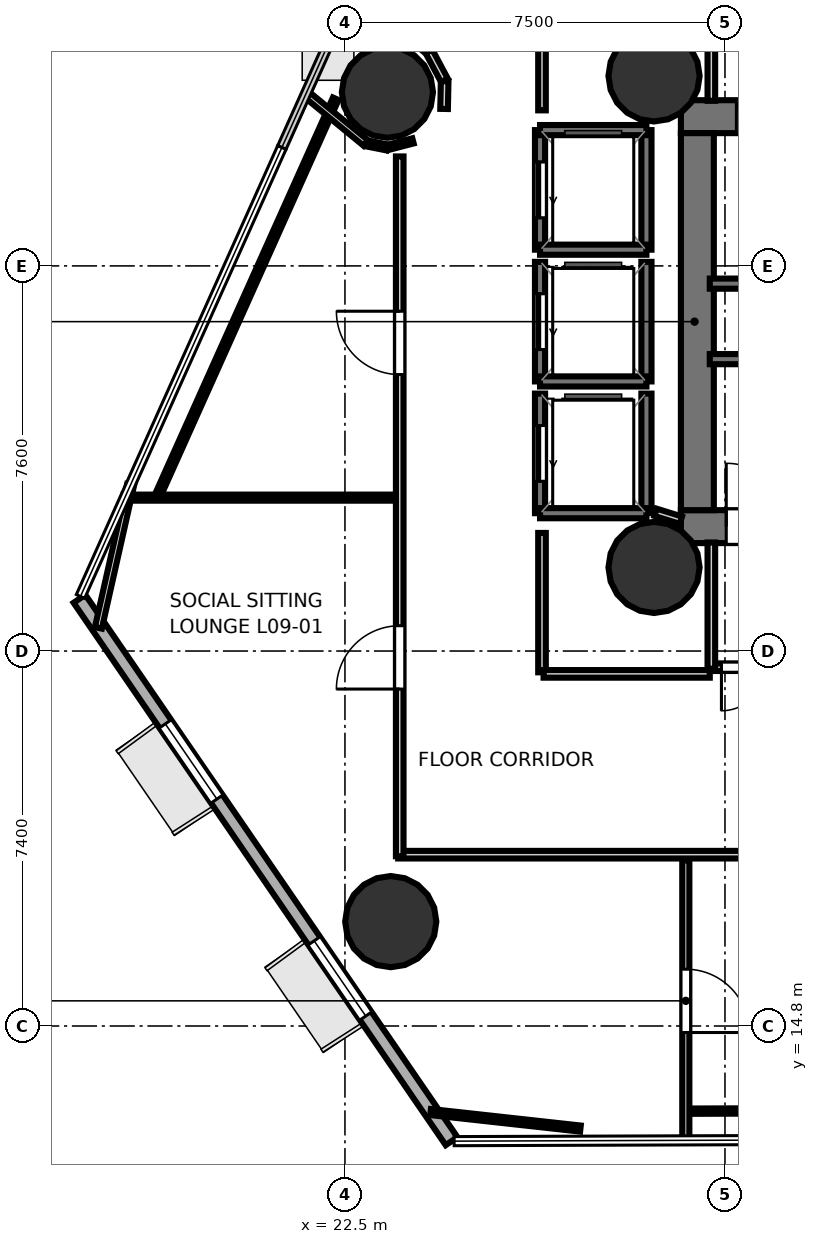
"""IFC4 building model, lengths in metres.
Left out: names, types, materials, properties, quantities, classifications, styles, units other than length and angle.
Written with IfcOpenShell. Run it as: python <this file> out.ifc"""

import sys

from ifc_helpers import new_model, si_unit, direction, frame, frame_2d, origin, origin_2d, place, context, subcontext, project, spatial, rectangle, hollow_circle, extrude, element, fill, save


model = new_model("IFC4")
c1 = context("Model", 3, precision=1e-05, world=origin(), true_north=direction((0.0, 1.0)))
c2 = subcontext(c1, "Body", "Model", "MODEL_VIEW")
j1 = project(units=[si_unit("LENGTHUNIT", "METRE"), si_unit("PLANEANGLEUNIT", "RADIAN")], contexts=[c1])
p1 = place(None, origin())
s1 = spatial("IfcSite", under=j1, at=p1, CompositionType="ELEMENT")
p2 = place(p1, origin())
s2 = spatial("IfcBuilding", under=s1, at=p2, CompositionType="ELEMENT")
p3 = place(p2, frame((0.0, 0.0, 40.5)))
s3 = spatial("IfcBuildingStorey", under=s2, at=p3, CompositionType="ELEMENT", Elevation=40.5)
p4 = place(p3, frame((29.13, 32.745, 0.0), z_axis=(0.0, 0.0, 1.0), x_axis=(1.0, 0.0, 0.0)))
e1 = element("IfcWall", 1, at=p4, inside=s3, PredefinedType="SHEAR", context=c2, shape_type="SweptSolid", body=[
    extrude(rectangle(XDim=10.72, YDim=0.65, at=frame_2d((5.36, 0.0))), origin(), (0.0, 0.0, 1.0), 3.52),
])
p5 = place(p4, frame((1.095, 0.0, 0.0)))
e2 = element("IfcOpeningElement", 2, at=p5, cuts=e1, PredefinedType="OPENING", context=c2, shape_type="SweptSolid", body=[
    extrude(rectangle(XDim=1.25, YDim=2.15, at=frame_2d((0.625, 1.075))), frame((0.0, 0.335, 0.0), z_axis=(0.0, -1.0, 0.0), x_axis=(1.0, 0.0, 0.0)), (0.0, 0.0, 1.0), 0.67),
])
p6 = place(p3, frame((29.13, 24.655, 0.0), z_axis=(0.0, 0.0, 1.0), x_axis=(1.0, 0.0, 0.0)))
e3 = element("IfcWall", 3, at=p6, inside=s3, PredefinedType="SHEAR", context=c2, shape_type="SweptSolid", body=[
    extrude(rectangle(XDim=10.72, YDim=0.65, at=frame_2d((5.36, 0.0))), origin(), (0.0, 0.0, 1.0), 3.52),
])
p7 = place(p6, frame((0.895, 0.0, 0.0)))
e4 = element("IfcOpeningElement", 4, at=p7, cuts=e3, PredefinedType="OPENING", context=c2, shape_type="SweptSolid", body=[
    extrude(rectangle(XDim=1.25, YDim=2.15, at=frame_2d((0.625, 1.075))), frame((0.0, 0.335, 0.0), z_axis=(0.0, -1.0, 0.0), x_axis=(1.0, 0.0, 0.0)), (0.0, 0.0, 1.0), 0.67),
])
p8 = place(p3, frame((29.455, 24.98, 0.0), z_axis=(0.0, 0.0, 1.0), x_axis=(0.0, 1.0, 0.0)))
e5 = element("IfcWall", 5, at=p8, inside=s3, PredefinedType="SHEAR", context=c2, shape_type="SweptSolid", body=[
    extrude(rectangle(XDim=7.44, YDim=0.65, at=frame_2d((3.72, 0.0))), origin(), (0.0, 0.0, 1.0), 3.52),
])
for number, where, z_axis, x_axis in (
    (6, (28.6, 33.55, 0.0), (0.0, 0.0, 1.0), (1.0, 0.0, 0.0)),
    (7, (28.6, 23.85, 0.0), (0.0, 0.0, 1.0), (1.0, 0.0, 0.0)),
    (8, (23.338, 33.228, 0.0), (0.0, 0.0, 1.0), (1.0, 0.0, 0.0)),
    (9, (23.404, 16.86, 0.0), (0.0, 0.0, 1.0), (1.0, 0.0, 0.0)),
):
    element("IfcColumn", number, at=place(p3, frame(where, z_axis=z_axis, x_axis=x_axis)), inside=s3, PredefinedType="COLUMN", context=c2, shape_type="SweptSolid", body=[
        extrude(hollow_circle(Radius=0.9, WallThickness=0.045, at=origin_2d()), origin(), (0.0, 0.0, 1.0), 3.7),
    ])
p9 = place(p3, frame((17.26, 23.232, 0.0), z_axis=(0.0, 0.0, 1.0), x_axis=(0.565752744853, -0.824574940009, 0.0)))
e10 = element("IfcWall", 10, at=p9, inside=s3, PredefinedType="SOLIDWALL", context=c2, shape_type="SweptSolid", body=[
    extrude(rectangle(XDim=12.981, YDim=0.28, at=frame_2d((6.491, 0.0))), origin(), (0.0, 0.0, 1.0), 3.52),
])
p10 = place(p9, frame((2.994, 0.0, 0.85)))
e11 = element("IfcOpeningElement", 11, at=p10, cuts=e10, PredefinedType="OPENING", context=c2, shape_type="SweptSolid", body=[
    extrude(rectangle(XDim=1.8, YDim=2.1, at=frame_2d((0.9, 1.05))), frame((0.0, 0.15, 0.0), z_axis=(0.0, -1.0, 0.0), x_axis=(1.0, 0.0, 0.0)), (0.0, 0.0, 1.0), 0.3),
])
p11 = place(p9, frame((8.187, 0.0, 0.85)))
e12 = element("IfcOpeningElement", 12, at=p11, cuts=e10, PredefinedType="OPENING", context=c2, shape_type="SweptSolid", body=[
    extrude(rectangle(XDim=1.8, YDim=2.1, at=frame_2d((0.9, 1.05))), frame((0.0, 0.15, 0.0), z_axis=(0.0, -1.0, 0.0), x_axis=(1.0, 0.0, 0.0)), (0.0, 0.0, 1.0), 0.3),
])
p12 = place(p3, frame((29.7, 29.45, 0.0), z_axis=(0.0, 0.0, 1.0), x_axis=(1.0, 0.0, 0.0)))
e13 = element("IfcWall", 13, at=p12, inside=s3, PredefinedType="SOLIDWALL", context=c2, shape_type="SweptSolid", body=[
    extrude(rectangle(XDim=8.3, YDim=0.2, at=frame_2d((4.15, 0.0))), origin(), (0.0, 0.0, 1.0), 3.52),
])
p13 = place(p3, frame((29.7, 27.96, 0.0), z_axis=(0.0, 0.0, 1.0), x_axis=(1.0, 0.0, 0.0)))
e14 = element("IfcWall", 14, at=p13, inside=s3, PredefinedType="SOLIDWALL", context=c2, shape_type="SweptSolid", body=[
    extrude(rectangle(XDim=7.75, YDim=0.2, at=frame_2d((3.875, 0.0))), origin(), (0.0, 0.0, 1.0), 3.52),
])
p14 = place(p3, frame((28.45, 30.12, 0.0), z_axis=(0.0, 0.0, 1.0), x_axis=(0.0, 1.0, 0.0)))
e15 = element("IfcWall", 15, at=p14, inside=s3, PredefinedType="SOLIDWALL", context=c2, shape_type="SweptSolid", body=[
    extrude(rectangle(XDim=2.36, YDim=0.2, at=frame_2d((1.18, 0.0))), origin(), (0.0, 0.0, 1.0), 3.52),
])
p15 = place(p3, frame((26.35, 30.12, 0.0), z_axis=(0.0, 0.0, 1.0), x_axis=(0.0, 1.0, 0.0)))
e16 = element("IfcWall", 16, at=p15, inside=s3, PredefinedType="SOLIDWALL", context=c2, shape_type="SweptSolid", body=[
    extrude(rectangle(XDim=2.36, YDim=0.2, at=frame_2d((1.18, 0.0))), origin(), (0.0, 0.0, 1.0), 3.52),
])
p16 = place(p15, frame((0.63, 0.0, 0.0)))
e17 = element("IfcOpeningElement", 17, at=p16, cuts=e16, PredefinedType="OPENING", context=c2, shape_type="SweptSolid", body=[
    extrude(rectangle(XDim=1.1, YDim=2.15, at=frame_2d((0.55, 1.075))), frame((0.0, 0.11, 0.0), z_axis=(0.0, -1.0, 0.0), x_axis=(1.0, 0.0, 0.0)), (0.0, 0.0, 1.0), 0.22),
])
for number, where, z_axis, x_axis in (
    (18, (26.35, 32.48, 0.0), (0.0, 0.0, 1.0), (1.0, 0.0, 0.0)),
    (19, (26.35, 30.12, 0.0), (0.0, 0.0, 1.0), (1.0, 0.0, 0.0)),
):
    element("IfcWall", number, at=place(p3, frame(where, z_axis=z_axis, x_axis=x_axis)), inside=s3, PredefinedType="SOLIDWALL", context=c2, shape_type="SweptSolid", body=[
        extrude(rectangle(XDim=2.1, YDim=0.2, at=frame_2d((1.05, 0.0))), origin(), (0.0, 0.0, 1.0), 3.52),
    ])
p17 = place(p3, frame((28.45, 27.52, 0.0), z_axis=(0.0, 0.0, 1.0), x_axis=(0.0, 1.0, 0.0)))
e20 = element("IfcWall", 20, at=p17, inside=s3, PredefinedType="SOLIDWALL", context=c2, shape_type="SweptSolid", body=[
    extrude(rectangle(XDim=2.36, YDim=0.2, at=frame_2d((1.18, 0.0))), origin(), (0.0, 0.0, 1.0), 3.52),
])
p18 = place(p3, frame((26.35, 27.52, 0.0), z_axis=(0.0, 0.0, 1.0), x_axis=(0.0, 1.0, 0.0)))
e21 = element("IfcWall", 21, at=p18, inside=s3, PredefinedType="SOLIDWALL", context=c2, shape_type="SweptSolid", body=[
    extrude(rectangle(XDim=2.36, YDim=0.2, at=frame_2d((1.18, 0.0))), origin(), (0.0, 0.0, 1.0), 3.52),
])
p19 = place(p18, frame((0.63, 0.0, 0.0)))
e22 = element("IfcOpeningElement", 22, at=p19, cuts=e21, PredefinedType="OPENING", context=c2, shape_type="SweptSolid", body=[
    extrude(rectangle(XDim=1.1, YDim=2.15, at=frame_2d((0.55, 1.075))), frame((0.0, 0.11, 0.0), z_axis=(0.0, -1.0, 0.0), x_axis=(1.0, 0.0, 0.0)), (0.0, 0.0, 1.0), 0.22),
])
p20 = place(p3, frame((26.35, 27.52, 0.0), z_axis=(0.0, 0.0, 1.0), x_axis=(1.0, 0.0, 0.0)))
e23 = element("IfcWall", 23, at=p20, inside=s3, PredefinedType="SOLIDWALL", context=c2, shape_type="SweptSolid", body=[
    extrude(rectangle(XDim=2.1, YDim=0.2, at=frame_2d((1.05, 0.0))), origin(), (0.0, 0.0, 1.0), 3.52),
])
p21 = place(p3, frame((28.45, 24.92, 0.0), z_axis=(0.0, 0.0, 1.0), x_axis=(0.0, 1.0, 0.0)))
e24 = element("IfcWall", 24, at=p21, inside=s3, PredefinedType="SOLIDWALL", context=c2, shape_type="SweptSolid", body=[
    extrude(rectangle(XDim=2.36, YDim=0.2, at=frame_2d((1.18, 0.0))), origin(), (0.0, 0.0, 1.0), 3.52),
])
p22 = place(p3, frame((26.35, 24.92, 0.0), z_axis=(0.0, 0.0, 1.0), x_axis=(0.0, 1.0, 0.0)))
e25 = element("IfcWall", 25, at=p22, inside=s3, PredefinedType="SOLIDWALL", context=c2, shape_type="SweptSolid", body=[
    extrude(rectangle(XDim=2.36, YDim=0.2, at=frame_2d((1.18, 0.0))), origin(), (0.0, 0.0, 1.0), 3.52),
])
p23 = place(p22, frame((0.63, 0.0, 0.0)))
e26 = element("IfcOpeningElement", 26, at=p23, cuts=e25, PredefinedType="OPENING", context=c2, shape_type="SweptSolid", body=[
    extrude(rectangle(XDim=1.1, YDim=2.15, at=frame_2d((0.55, 1.075))), frame((0.0, 0.11, 0.0), z_axis=(0.0, -1.0, 0.0), x_axis=(1.0, 0.0, 0.0)), (0.0, 0.0, 1.0), 0.22),
])
p24 = place(p3, frame((26.35, 24.92, 0.0), z_axis=(0.0, 0.0, 1.0), x_axis=(1.0, 0.0, 0.0)))
e27 = element("IfcWall", 27, at=p24, inside=s3, PredefinedType="SOLIDWALL", context=c2, shape_type="SweptSolid", body=[
    extrude(rectangle(XDim=2.1, YDim=0.2, at=frame_2d((1.05, 0.0))), origin(), (0.0, 0.0, 1.0), 3.52),
])
p25 = place(p3, frame((29.731, 33.058, 0.0), z_axis=(0.0, 0.0, 1.0), x_axis=(0.0, 1.0, 0.0)))
e28 = element("IfcWall", 28, at=p25, inside=s3, PredefinedType="PARTITIONING", context=c2, shape_type="SweptSolid", body=[
    extrude(rectangle(XDim=2.462, YDim=0.15, at=frame_2d((1.231, 0.0))), origin(), (0.0, 0.0, 1.0), 2.84),
])
p26 = place(p3, frame((33.45, 21.881, 0.0), z_axis=(0.0, 0.0, 1.0), x_axis=(-1.0, 0.0, 0.0)))
e29 = element("IfcWall", 29, at=p26, inside=s3, PredefinedType="PARTITIONING", context=c2, shape_type="SweptSolid", body=[
    extrude(rectangle(XDim=3.75, YDim=0.15, at=frame_2d((1.875, 0.0))), origin(), (0.0, 0.0, 1.0), 2.84),
])
p27 = place(p26, frame((1.275, 0.0, 0.0)))
e30 = element("IfcOpeningElement", 30, at=p27, cuts=e29, PredefinedType="OPENING", context=c2, shape_type="SweptSolid", body=[
    extrude(rectangle(XDim=1.2, YDim=2.15, at=frame_2d((0.6, 1.075))), frame((0.0, 0.085, 0.0), z_axis=(0.0, -1.0, 0.0), x_axis=(1.0, 0.0, 0.0)), (0.0, 0.0, 1.0), 0.17),
])
p28 = place(p26, frame((2.66, 0.0, 0.0)))
e31 = element("IfcOpeningElement", 31, at=p28, cuts=e29, PredefinedType="OPENING", context=c2, shape_type="SweptSolid", body=[
    extrude(rectangle(XDim=0.86, YDim=2.05, at=frame_2d((0.43, 1.025))), frame((0.0, 0.085, 0.0), z_axis=(0.0, -1.0, 0.0), x_axis=(1.0, 0.0, 0.0)), (0.0, 0.0, 1.0), 0.17),
])
p29 = place(p3, frame((29.731, 21.85, 0.0), z_axis=(0.0, 0.0, 1.0), x_axis=(0.0, 1.0, 0.0)))
e32 = element("IfcWall", 32, at=p29, inside=s3, PredefinedType="PARTITIONING", context=c2, shape_type="SweptSolid", body=[
    extrude(rectangle(XDim=2.492, YDim=0.15, at=frame_2d((1.246, 0.0))), origin(), (0.0, 0.0, 1.0), 2.84),
])
p30 = place(p3, frame((29.13, 24.782, 0.0), z_axis=(0.0, 0.0, 1.0), x_axis=(-0.955000482512, 0.296604245422, 0.0)))
e33 = element("IfcWall", 33, at=p30, inside=s3, PredefinedType="PARTITIONING", context=c2, shape_type="SweptSolid", body=[
    extrude(rectangle(XDim=0.524, YDim=0.15, at=frame_2d((0.262, 0.0))), origin(), (0.0, 0.0, 1.0), 2.84),
])
p31 = place(p3, frame((24.464, 33.461, 0.0), z_axis=(0.0, 0.0, 1.0), x_axis=(-0.4715232649, 0.881853622014, 0.0)))
e34 = element("IfcWall", 34, at=p31, inside=s3, PredefinedType="PARTITIONING", context=c2, shape_type="SweptSolid", body=[
    extrude(rectangle(XDim=0.65, YDim=0.15, at=frame_2d((0.325, 0.0))), origin(), (0.0, 0.0, 1.0), 2.798),
])
p32 = place(p3, frame((24.15, 34.044, 0.0), z_axis=(0.0, 0.0, 1.0), x_axis=(-0.773007182635, 0.634397269536, 0.0)))
e35 = element("IfcWall", 35, at=p32, inside=s3, PredefinedType="PARTITIONING", context=c2, shape_type="SweptSolid", body=[
    extrude(rectangle(XDim=1.948, YDim=0.15, at=frame_2d((0.974, 0.0))), origin(), (0.0, 0.0, 1.0), 2.798),
])
p33 = place(p3, frame((26.389, 35.58, 0.0), z_axis=(0.0, 0.0, 1.0), x_axis=(0.0, -1.0, 0.0)))
e36 = element("IfcWall", 36, at=p33, inside=s3, PredefinedType="PARTITIONING", context=c2, shape_type="SweptSolid", body=[
    extrude(rectangle(XDim=2.71, YDim=0.15, at=frame_2d((1.355, 0.0))), origin(), (0.0, 0.0, 1.0), 2.798),
])
p34 = place(p3, frame((26.389, 24.531, 0.0), z_axis=(0.0, 0.0, 1.0), x_axis=(0.0, -1.0, 0.0)))
e37 = element("IfcWall", 37, at=p34, inside=s3, PredefinedType="PARTITIONING", context=c2, shape_type="SweptSolid", body=[
    extrude(rectangle(XDim=2.75, YDim=0.15, at=frame_2d((1.375, 0.0))), origin(), (0.0, 0.0, 1.0), 2.84),
])
p35 = place(p3, frame((26.42, 21.749, 0.0), z_axis=(0.0, 0.0, 1.0), x_axis=(1.0, 0.0, 0.0)))
e38 = element("IfcWall", 38, at=p35, inside=s3, PredefinedType="PARTITIONING", context=c2, shape_type="SweptSolid", body=[
    extrude(rectangle(XDim=3.28, YDim=0.15, at=frame_2d((1.64, 0.0))), origin(), (0.0, 0.0, 1.0), 2.84),
])
p36 = place(p3, frame((33.32, 18.181, 0.0), z_axis=(0.0, 0.0, 1.0), x_axis=(-1.0, 0.0, 0.0)))
e39 = element("IfcWall", 39, at=p36, inside=s3, PredefinedType="PARTITIONING", context=c2, shape_type="SweptSolid", body=[
    extrude(rectangle(XDim=9.77, YDim=0.15, at=frame_2d((4.885, 0.0))), origin(), (0.0, 0.0, 1.0), 2.798),
])
p37 = place(p3, frame((23.581, 18.15, 0.0), z_axis=(0.0, 0.0, 1.0), x_axis=(0.0, 1.0, 0.0)))
e40 = element("IfcWall", 40, at=p37, inside=s3, PredefinedType="PARTITIONING", context=c2, shape_type="SweptSolid", body=[
    extrude(rectangle(XDim=13.81, YDim=0.15, at=frame_2d((6.905, 0.0))), origin(), (0.0, 0.0, 1.0), 2.798),
])
p38 = place(p37, frame((3.299, 0.0, 0.0)))
e41 = element("IfcOpeningElement", 41, at=p38, cuts=e40, PredefinedType="OPENING", context=c2, shape_type="SweptSolid", body=[
    extrude(rectangle(XDim=1.25, YDim=2.2, at=frame_2d((0.625, 1.1))), frame((0.0, 0.085, 0.0), z_axis=(0.0, -1.0, 0.0), x_axis=(1.0, 0.0, 0.0)), (0.0, 0.0, 1.0), 0.17),
])
p39 = place(p37, frame((9.506, 0.0, 0.0)))
e42 = element("IfcOpeningElement", 42, at=p39, cuts=e40, PredefinedType="OPENING", context=c2, shape_type="SweptSolid", body=[
    extrude(rectangle(XDim=1.25, YDim=2.2, at=frame_2d((0.625, 1.1))), frame((0.0, 0.085, 0.0), z_axis=(0.0, -1.0, 0.0), x_axis=(1.0, 0.0, 0.0)), (0.0, 0.0, 1.0), 0.17),
])
p40 = place(p3, frame((24.457, 32.897, 0.0), z_axis=(0.0, 0.0, 1.0), x_axis=(0.020031598679, 0.999799347396, 0.0)))
e43 = element("IfcWall", 43, at=p40, inside=s3, PredefinedType="PARTITIONING", context=c2, shape_type="SweptSolid", body=[
    extrude(rectangle(XDim=0.548, YDim=0.15, at=frame_2d((0.274, 0.0))), origin(), (0.0, 0.0, 1.0), 2.84),
])
p41 = place(p3, frame((29.227, 18.07, 0.0), z_axis=(0.0, 0.0, 1.0), x_axis=(0.0, -1.0, 0.0)))
e44 = element("IfcWall", 44, at=p41, inside=s3, PredefinedType="PARTITIONING", context=c2, shape_type="SweptSolid", body=[
    extrude(rectangle(XDim=5.547, YDim=0.14, at=frame_2d((2.773, 0.0))), origin(), (0.0, 0.0, 1.0), 2.798),
])
p42 = place(p41, frame((2.148, 0.0, 0.0)))
e45 = element("IfcOpeningElement", 45, at=p42, cuts=e44, PredefinedType="OPENING", context=c2, shape_type="SweptSolid", body=[
    extrude(rectangle(XDim=1.25, YDim=2.2, at=frame_2d((0.625, 1.1))), frame((0.0, 0.08, 0.0), z_axis=(0.0, -1.0, 0.0), x_axis=(1.0, 0.0, 0.0)), (0.0, 0.0, 1.0), 0.16),
])
p43 = place(p3, frame((27.147, 12.776, 0.0), z_axis=(0.0, 0.0, 1.0), x_axis=(-0.993980428433, 0.109557783352, 0.0)))
e46 = element("IfcWall", 46, at=p43, inside=s3, PredefinedType="PARTITIONING", context=c2, shape_type="SweptSolid", body=[
    extrude(rectangle(XDim=2.975, YDim=0.12, at=frame_2d((1.487, 0.0))), origin(), (0.0, 0.0, 1.0), 2.84),
])
p44 = place(p3, frame((17.634, 22.657, 0.0), z_axis=(0.0, 0.0, 1.0), x_axis=(0.219546313743, 0.975602078781, 0.0)))
e47 = element("IfcWall", 47, at=p44, inside=s3, PredefinedType="PARTITIONING", context=c2, shape_type="SweptSolid", body=[
    extrude(rectangle(XDim=2.895, YDim=0.14, at=frame_2d((1.447, 0.0))), origin(), (0.0, 0.0, 1.0), 2.84),
])
p45 = place(p3, frame((18.135, 25.227, 0.0), z_axis=(0.0, 0.0, 1.0), x_axis=(1.0, 0.0, 0.0)))
e48 = element("IfcWall", 48, at=p45, inside=s3, PredefinedType="PARTITIONING", context=c2, shape_type="SweptSolid", body=[
    extrude(rectangle(XDim=5.334, YDim=0.12, at=frame_2d((2.667, 0.0))), origin(), (0.0, 0.0, 1.0), 2.798),
])
p46 = place(p3, frame((38.658, 13.151, 0.0), z_axis=(0.0, 0.0, 1.0), x_axis=(-0.999994285849, -0.003380572417, 0.0)))
e49 = element("IfcWall", 49, at=p46, inside=s3, PredefinedType="PARTITIONING", context=c2, shape_type="SweptSolid", body=[
    extrude(rectangle(XDim=9.316, YDim=0.105, at=frame_2d((4.658, 0.0))), origin(), (0.0, 0.0, 1.0), 2.798),
])
p47 = place(p3, frame((18.833, 25.329, 0.0), z_axis=(0.0, 0.0, 1.0), x_axis=(0.409306972624, 0.912396735067, 0.0)))
e50 = element("IfcWall", 50, at=p47, inside=s3, PredefinedType="PARTITIONING", context=c2, shape_type="SweptSolid", body=[
    extrude(rectangle(XDim=8.515, YDim=0.12, at=frame_2d((4.258, 0.0))), origin(), (0.0, 0.0, 1.0), 2.798),
])
p48 = place(p3, frame((21.714, 33.208, 0.0), z_axis=(0.0, 0.0, 1.0), x_axis=(0.7730020736, -0.634403494796, 0.0)))
e51 = element("IfcWall", 51, at=p48, inside=s3, PredefinedType="PARTITIONING", context=c2, shape_type="SweptSolid", body=[
    extrude(rectangle(XDim=1.55, YDim=0.14, at=frame_2d((0.775, 0.0))), origin(), (0.0, 0.0, 1.0), 2.798),
])
p49 = place(p3, frame((22.926, 32.218, 0.0), z_axis=(0.0, 0.0, 1.0), x_axis=(0.980852113174, -0.194754029692, 0.0)))
e52 = element("IfcWall", 52, at=p49, inside=s3, PredefinedType="PARTITIONING", context=c2, shape_type="SweptSolid", body=[
    extrude(rectangle(XDim=0.414, YDim=0.12, at=frame_2d((0.207, 0.0))), origin(), (0.0, 0.0, 1.0), 2.798),
])
p50 = place(p3, frame((23.346, 32.138, 0.0), z_axis=(0.0, 0.0, 1.0), x_axis=(0.967662659088, 0.252247850749, 0.0)))
e53 = element("IfcWall", 53, at=p50, inside=s3, PredefinedType="PARTITIONING", context=c2, shape_type="SweptSolid", body=[
    extrude(rectangle(XDim=0.514, YDim=0.105, at=frame_2d((0.257, 0.0))), origin(), (0.0, 0.0, 1.0), 2.798),
])
p51 = place(p5, origin())
e54 = element("IfcDoor", 54, at=p51, inside=s3, OperationType="SINGLE_SWING_RIGHT", PredefinedType="DOOR", context=c2, shape_type="SweptSolid", body=[
    extrude(rectangle(XDim=1.25, YDim=2.15, at=frame_2d((0.625, 1.075))), frame((0.0, 0.025, 0.0), z_axis=(0.0, -1.0, 0.0), x_axis=(1.0, 0.0, 0.0)), (0.0, 0.0, 1.0), 0.05),
])
fill(e2, e54)
p52 = place(p7, origin())
e55 = element("IfcDoor", 55, at=p52, inside=s3, OperationType="SINGLE_SWING_LEFT", PredefinedType="DOOR", context=c2, shape_type="SweptSolid", body=[
    extrude(rectangle(XDim=1.25, YDim=2.15, at=frame_2d((0.625, 1.075))), frame((0.0, 0.025, 0.0), z_axis=(0.0, -1.0, 0.0), x_axis=(1.0, 0.0, 0.0)), (0.0, 0.0, 1.0), 0.05),
])
fill(e4, e55)
p53 = place(p16, origin())
e56 = element("IfcDoor", 56, at=p53, inside=s3, OperationType="SLIDING_TO_LEFT", PredefinedType="DOOR", context=c2, shape_type="SweptSolid", body=[
    extrude(rectangle(XDim=1.1, YDim=2.15, at=frame_2d((0.55, 1.075))), frame((0.0, 0.025, 0.0), z_axis=(0.0, -1.0, 0.0), x_axis=(1.0, 0.0, 0.0)), (0.0, 0.0, 1.0), 0.05),
])
fill(e17, e56)
p54 = place(p19, origin())
e57 = element("IfcDoor", 57, at=p54, inside=s3, OperationType="SLIDING_TO_LEFT", PredefinedType="DOOR", context=c2, shape_type="SweptSolid", body=[
    extrude(rectangle(XDim=1.1, YDim=2.15, at=frame_2d((0.55, 1.075))), frame((0.0, 0.025, 0.0), z_axis=(0.0, -1.0, 0.0), x_axis=(1.0, 0.0, 0.0)), (0.0, 0.0, 1.0), 0.05),
])
fill(e22, e57)
p55 = place(p23, origin())
e58 = element("IfcDoor", 58, at=p55, inside=s3, OperationType="SLIDING_TO_LEFT", PredefinedType="DOOR", context=c2, shape_type="SweptSolid", body=[
    extrude(rectangle(XDim=1.1, YDim=2.15, at=frame_2d((0.55, 1.075))), frame((0.0, 0.025, 0.0), z_axis=(0.0, -1.0, 0.0), x_axis=(1.0, 0.0, 0.0)), (0.0, 0.0, 1.0), 0.05),
])
fill(e26, e58)
p56 = place(p28, origin())
e59 = element("IfcDoor", 59, at=p56, inside=s3, OperationType="SINGLE_SWING_RIGHT", PredefinedType="DOOR", context=c2, shape_type="SweptSolid", body=[
    extrude(rectangle(XDim=0.86, YDim=2.05, at=frame_2d((0.43, 1.025))), frame((0.0, 0.025, 0.0), z_axis=(0.0, -1.0, 0.0), x_axis=(1.0, 0.0, 0.0)), (0.0, 0.0, 1.0), 0.05),
])
fill(e31, e59)
p57 = place(p38, origin())
e60 = element("IfcDoor", 60, at=p57, inside=s3, OperationType="SINGLE_SWING_LEFT", PredefinedType="DOOR", context=c2, shape_type="SweptSolid", body=[
    extrude(rectangle(XDim=1.25, YDim=2.2, at=frame_2d((0.625, 1.1))), frame((0.0, 0.025, 0.0), z_axis=(0.0, -1.0, 0.0), x_axis=(1.0, 0.0, 0.0)), (0.0, 0.0, 1.0), 0.05),
])
fill(e41, e60)
p58 = place(p39, origin())
e61 = element("IfcDoor", 61, at=p58, inside=s3, OperationType="SINGLE_SWING_RIGHT", PredefinedType="DOOR", context=c2, shape_type="SweptSolid", body=[
    extrude(rectangle(XDim=1.25, YDim=2.2, at=frame_2d((0.625, 1.1))), frame((0.0, 0.025, 0.0), z_axis=(0.0, -1.0, 0.0), x_axis=(1.0, 0.0, 0.0)), (0.0, 0.0, 1.0), 0.05),
])
fill(e42, e61)
p59 = place(p42, origin())
e62 = element("IfcDoor", 62, at=p59, inside=s3, OperationType="SINGLE_SWING_RIGHT", PredefinedType="DOOR", context=c2, shape_type="SweptSolid", body=[
    extrude(rectangle(XDim=1.25, YDim=2.2, at=frame_2d((0.625, 1.1))), frame((0.0, 0.025, 0.0), z_axis=(0.0, -1.0, 0.0), x_axis=(1.0, 0.0, 0.0)), (0.0, 0.0, 1.0), 0.05),
])
fill(e45, e62)
p60 = place(p10, origin())
e63 = element("IfcWindow", 63, at=p60, inside=s3, PartitioningType="SINGLE_PANEL", PredefinedType="WINDOW", context=c2, shape_type="SweptSolid", body=[
    extrude(rectangle(XDim=1.8, YDim=2.1, at=frame_2d((0.9, 1.05))), frame((0.0, 0.03, 0.0), z_axis=(0.0, -1.0, 0.0), x_axis=(1.0, 0.0, 0.0)), (0.0, 0.0, 1.0), 0.06),
])
fill(e11, e63)
p61 = place(p11, origin())
e64 = element("IfcWindow", 64, at=p61, inside=s3, PartitioningType="SINGLE_PANEL", PredefinedType="WINDOW", context=c2, shape_type="SweptSolid", body=[
    extrude(rectangle(XDim=1.8, YDim=2.1, at=frame_2d((0.9, 1.05))), frame((0.0, 0.03, 0.0), z_axis=(0.0, -1.0, 0.0), x_axis=(1.0, 0.0, 0.0)), (0.0, 0.0, 1.0), 0.06),
])
fill(e12, e64)
save(model, sys.argv[1])
